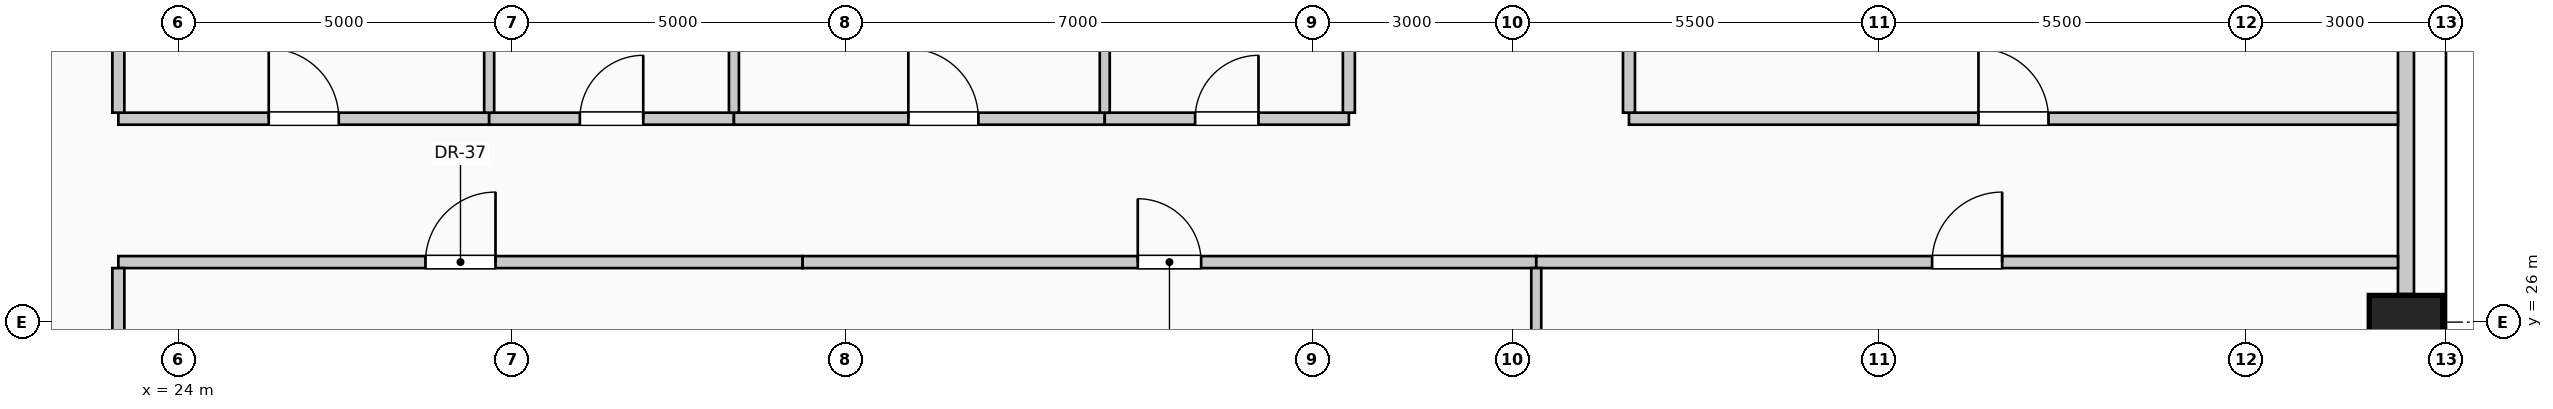
"""IFC4 building model, lengths in metres.
Left out: names, types, materials, properties, quantities, classifications, styles, units other than length and angle.
Written with IfcOpenShell. Run it as: python <this file> out.ifc"""

import sys

from ifc_helpers import new_model, si_unit, direction, frame, frame_2d, origin, origin_2d, place, context, subcontext, project, spatial, rectangle, extrude, element, fill, save


model = new_model("IFC4")
c1 = context("Model", 3, precision=1e-05, world=origin(), true_north=direction((0.0, 1.0)))
c2 = subcontext(c1, "Body", "Model", "MODEL_VIEW")
j1 = project(units=[si_unit("LENGTHUNIT", "METRE"), si_unit("PLANEANGLEUNIT", "RADIAN")], contexts=[c1])
p1 = place(None, origin())
s1 = spatial("IfcSite", under=j1, at=p1, CompositionType="ELEMENT")
p2 = place(p1, origin())
s2 = spatial("IfcBuilding", under=s1, at=p2, CompositionType="ELEMENT")
p3 = place(p2, frame((0.0, 0.0, 178.6)))
s3 = spatial("IfcBuildingStorey", under=s2, at=p3, CompositionType="ELEMENT", Elevation=178.6)
p4 = place(p3, frame((57.4, 26.0, 0.0), z_axis=(0.0, 0.0, 1.0), x_axis=(0.0, 1.0, 0.0)))
e1 = element("IfcColumn", 1, at=p4, inside=s3, PredefinedType="COLUMN", context=c2, shape_type="SweptSolid", body=[
    extrude(rectangle(XDim=0.8, YDim=1.1, at=origin_2d()), origin(), (0.0, 0.0, 1.0), 4.0),
])
p5 = place(p3, frame((57.4, 33.58, 0.0), z_axis=(0.0, 0.0, 1.0), x_axis=(0.0, -1.0, 0.0)))
e2 = element("IfcWall", 2, at=p5, inside=s3, PredefinedType="SOLIDWALL", context=c2, shape_type="SweptSolid", body=[
    extrude(rectangle(XDim=7.16, YDim=0.24, at=frame_2d((3.58, 0.0))), origin(), (0.0, 0.0, 1.0), 3.0),
])
p6 = place(p3, frame((23.1, 26.9, 0.0), z_axis=(0.0, 0.0, 1.0), x_axis=(1.0, 0.0, 0.0)))
e3 = element("IfcWall", 3, at=p6, inside=s3, PredefinedType="PARTITIONING", context=c2, shape_type="SweptSolid", body=[
    extrude(rectangle(XDim=10.26, YDim=0.18, at=frame_2d((5.13, 0.0))), origin(), (0.0, 0.0, 1.0), 3.75),
])
p7 = place(p6, frame((4.605, 0.0, 0.0)))
e4 = element("IfcOpeningElement", 4, at=p7, cuts=e3, PredefinedType="OPENING", context=c2, shape_type="SweptSolid", body=[
    extrude(rectangle(XDim=1.05, YDim=2.15, at=frame_2d((0.525, 1.075))), frame((0.0, 0.1, 0.0), z_axis=(0.0, -1.0, 0.0), x_axis=(1.0, 0.0, 0.0)), (0.0, 0.0, 1.0), 0.2),
])
p8 = place(p3, frame((33.36, 26.9, 0.0), z_axis=(0.0, 0.0, 1.0), x_axis=(1.0, 0.0, 0.0)))
e5 = element("IfcWall", 5, at=p8, inside=s3, PredefinedType="PARTITIONING", context=c2, shape_type="SweptSolid", body=[
    extrude(rectangle(XDim=11.0, YDim=0.18, at=frame_2d((5.5, 0.0))), origin(), (0.0, 0.0, 1.0), 3.75),
])
p9 = place(p8, frame((5.025, 0.0, 0.0)))
e6 = element("IfcOpeningElement", 6, at=p9, cuts=e5, PredefinedType="OPENING", context=c2, shape_type="SweptSolid", body=[
    extrude(rectangle(XDim=0.95, YDim=2.15, at=frame_2d((0.475, 1.075))), frame((0.0, 0.1, 0.0), z_axis=(0.0, -1.0, 0.0), x_axis=(1.0, 0.0, 0.0)), (0.0, 0.0, 1.0), 0.2),
])
p10 = place(p3, frame((44.36, 26.9, 0.0), z_axis=(0.0, 0.0, 1.0), x_axis=(1.0, 0.0, 0.0)))
e7 = element("IfcWall", 7, at=p10, inside=s3, PredefinedType="PARTITIONING", context=c2, shape_type="SweptSolid", body=[
    extrude(rectangle(XDim=12.92, YDim=0.18, at=frame_2d((6.46, 0.0))), origin(), (0.0, 0.0, 1.0), 3.75),
])
p11 = place(p10, frame((5.935, 0.0, 0.0)))
e8 = element("IfcOpeningElement", 8, at=p11, cuts=e7, PredefinedType="OPENING", context=c2, shape_type="SweptSolid", body=[
    extrude(rectangle(XDim=1.05, YDim=2.15, at=frame_2d((0.525, 1.075))), frame((0.0, 0.1, 0.0), z_axis=(0.0, -1.0, 0.0), x_axis=(1.0, 0.0, 0.0)), (0.0, 0.0, 1.0), 0.2),
])
p12 = place(p3, frame((23.1, 29.05, 0.0), z_axis=(0.0, 0.0, 1.0), x_axis=(1.0, 0.0, 0.0)))
e9 = element("IfcWall", 9, at=p12, inside=s3, PredefinedType="PARTITIONING", context=c2, shape_type="SweptSolid", body=[
    extrude(rectangle(XDim=5.56, YDim=0.18, at=frame_2d((2.78, 0.0))), origin(), (0.0, 0.0, 1.0), 3.75),
])
p13 = place(p12, frame((2.255, 0.0, 0.0)))
e10 = element("IfcOpeningElement", 10, at=p13, cuts=e9, PredefinedType="OPENING", context=c2, shape_type="SweptSolid", body=[
    extrude(rectangle(XDim=1.05, YDim=2.15, at=frame_2d((0.525, 1.075))), frame((0.0, 0.1, 0.0), z_axis=(0.0, -1.0, 0.0), x_axis=(1.0, 0.0, 0.0)), (0.0, 0.0, 1.0), 0.2),
])
p14 = place(p3, frame((28.66, 29.05, 0.0), z_axis=(0.0, 0.0, 1.0), x_axis=(1.0, 0.0, 0.0)))
e11 = element("IfcWall", 11, at=p14, inside=s3, PredefinedType="PARTITIONING", context=c2, shape_type="SweptSolid", body=[
    extrude(rectangle(XDim=3.67, YDim=0.18, at=frame_2d((1.835, 0.0))), origin(), (0.0, 0.0, 1.0), 3.75),
])
p15 = place(p14, frame((1.36, 0.0, 0.0)))
e12 = element("IfcOpeningElement", 12, at=p15, cuts=e11, PredefinedType="OPENING", context=c2, shape_type="SweptSolid", body=[
    extrude(rectangle(XDim=0.95, YDim=2.15, at=frame_2d((0.475, 1.075))), frame((0.0, 0.1, 0.0), z_axis=(0.0, -1.0, 0.0), x_axis=(1.0, 0.0, 0.0)), (0.0, 0.0, 1.0), 0.2),
])
p16 = place(p3, frame((32.33, 29.05, 0.0), z_axis=(0.0, 0.0, 1.0), x_axis=(1.0, 0.0, 0.0)))
e13 = element("IfcWall", 13, at=p16, inside=s3, PredefinedType="PARTITIONING", context=c2, shape_type="SweptSolid", body=[
    extrude(rectangle(XDim=5.56, YDim=0.18, at=frame_2d((2.78, 0.0))), origin(), (0.0, 0.0, 1.0), 3.75),
])
p17 = place(p16, frame((2.615, 0.0, 0.0)))
e14 = element("IfcOpeningElement", 14, at=p17, cuts=e13, PredefinedType="OPENING", context=c2, shape_type="SweptSolid", body=[
    extrude(rectangle(XDim=1.05, YDim=2.15, at=frame_2d((0.525, 1.075))), frame((0.0, 0.1, 0.0), z_axis=(0.0, -1.0, 0.0), x_axis=(1.0, 0.0, 0.0)), (0.0, 0.0, 1.0), 0.2),
])
p18 = place(p3, frame((37.89, 29.05, 0.0), z_axis=(0.0, 0.0, 1.0), x_axis=(1.0, 0.0, 0.0)))
e15 = element("IfcWall", 15, at=p18, inside=s3, PredefinedType="PARTITIONING", context=c2, shape_type="SweptSolid", body=[
    extrude(rectangle(XDim=3.66, YDim=0.18, at=frame_2d((1.83, 0.0))), origin(), (0.0, 0.0, 1.0), 3.75),
])
p19 = place(p18, frame((1.355, 0.0, 0.0)))
e16 = element("IfcOpeningElement", 16, at=p19, cuts=e15, PredefinedType="OPENING", context=c2, shape_type="SweptSolid", body=[
    extrude(rectangle(XDim=0.95, YDim=2.15, at=frame_2d((0.475, 1.075))), frame((0.0, 0.1, 0.0), z_axis=(0.0, -1.0, 0.0), x_axis=(1.0, 0.0, 0.0)), (0.0, 0.0, 1.0), 0.2),
])
p20 = place(p3, frame((45.75, 29.05, 0.0), z_axis=(0.0, 0.0, 1.0), x_axis=(1.0, 0.0, 0.0)))
e17 = element("IfcWall", 17, at=p20, inside=s3, PredefinedType="PARTITIONING", context=c2, shape_type="SweptSolid", body=[
    extrude(rectangle(XDim=11.53, YDim=0.18, at=frame_2d((5.765, 0.0))), origin(), (0.0, 0.0, 1.0), 3.75),
])
p21 = place(p20, frame((5.24, 0.0, 0.0)))
e18 = element("IfcOpeningElement", 18, at=p21, cuts=e17, PredefinedType="OPENING", context=c2, shape_type="SweptSolid", body=[
    extrude(rectangle(XDim=1.05, YDim=2.15, at=frame_2d((0.525, 1.075))), frame((0.0, 0.1, 0.0), z_axis=(0.0, -1.0, 0.0), x_axis=(1.0, 0.0, 0.0)), (0.0, 0.0, 1.0), 0.2),
])
p22 = place(p3, frame((23.1, 17.3, 0.0), z_axis=(0.0, 0.0, 1.0), x_axis=(0.0, 1.0, 0.0)))
e19 = element("IfcWall", 19, at=p22, inside=s3, PredefinedType="PARTITIONING", context=c2, shape_type="SweptSolid", body=[
    extrude(rectangle(XDim=9.51, YDim=0.18, at=frame_2d((4.755, 0.0))), origin(), (0.0, 0.0, 1.0), 3.75),
])
p23 = place(p3, frame((23.1, 29.14, 0.0), z_axis=(0.0, 0.0, 1.0), x_axis=(0.0, 1.0, 0.0)))
e20 = element("IfcWall", 20, at=p23, inside=s3, PredefinedType="PARTITIONING", context=c2, shape_type="SweptSolid", body=[
    extrude(rectangle(XDim=3.12, YDim=0.18, at=frame_2d((1.56, 0.0))), origin(), (0.0, 0.0, 1.0), 3.75),
])
p24 = place(p3, frame((28.66, 29.14, 0.0), z_axis=(0.0, 0.0, 1.0), x_axis=(0.0, 1.0, 0.0)))
e21 = element("IfcWall", 21, at=p24, inside=s3, PredefinedType="PARTITIONING", context=c2, shape_type="SweptSolid", body=[
    extrude(rectangle(XDim=4.435, YDim=0.15, at=frame_2d((2.218, 0.0))), origin(), (0.0, 0.0, 1.0), 3.75),
])
for number, where, z_axis, x_axis in (
    (22, (32.33, 29.14, 0.0), (0.0, 0.0, 1.0), (0.0, 1.0, 0.0)),
    (23, (37.89, 29.14, 0.0), (0.0, 0.0, 1.0), (0.0, 1.0, 0.0)),
):
    element("IfcWall", number, at=place(p3, frame(where, z_axis=z_axis, x_axis=x_axis)), inside=s3, PredefinedType="PARTITIONING", context=c2, shape_type="SweptSolid", body=[
        extrude(rectangle(XDim=16.14, YDim=0.15, at=frame_2d((8.07, 0.0))), origin(), (0.0, 0.0, 1.0), 3.75),
    ])
p25 = place(p3, frame((41.55, 29.14, 0.0), z_axis=(0.0, 0.0, 1.0), x_axis=(0.0, 1.0, 0.0)))
e24 = element("IfcWall", 24, at=p25, inside=s3, PredefinedType="PARTITIONING", context=c2, shape_type="SweptSolid", body=[
    extrude(rectangle(XDim=3.21, YDim=0.18, at=frame_2d((1.605, 0.0))), origin(), (0.0, 0.0, 1.0), 3.145),
])
p26 = place(p3, frame((44.36, 1.15, 0.0), z_axis=(0.0, 0.0, 1.0), x_axis=(0.0, 1.0, 0.0)))
e25 = element("IfcWall", 25, at=p26, inside=s3, PredefinedType="PARTITIONING", context=c2, shape_type="SweptSolid", body=[
    extrude(rectangle(XDim=25.66, YDim=0.15, at=frame_2d((12.83, 0.0))), origin(), (0.0, 0.0, 1.0), 3.75),
])
p27 = place(p3, frame((45.75, 29.14, 0.0), z_axis=(0.0, 0.0, 1.0), x_axis=(0.0, 1.0, 0.0)))
e26 = element("IfcWall", 26, at=p27, inside=s3, PredefinedType="PARTITIONING", context=c2, shape_type="SweptSolid", body=[
    extrude(rectangle(XDim=3.135, YDim=0.18, at=frame_2d((1.567, 0.0))), origin(), (0.0, 0.0, 1.0), 3.75),
])
p28 = place(p7, origin())
e27 = element("IfcDoor", 27, at=p28, inside=s3, OperationType="SINGLE_SWING_RIGHT", PredefinedType="DOOR", context=c2, shape_type="SweptSolid", body=[
    extrude(rectangle(XDim=1.05, YDim=2.15, at=frame_2d((0.525, 1.075))), frame((0.0, 0.025, 0.0), z_axis=(0.0, -1.0, 0.0), x_axis=(1.0, 0.0, 0.0)), (0.0, 0.0, 1.0), 0.05),
])
fill(e4, e27)
p29 = place(p9, origin())
e28 = element("IfcDoor", 28, at=p29, inside=s3, OperationType="SINGLE_SWING_LEFT", PredefinedType="DOOR", context=c2, shape_type="SweptSolid", body=[
    extrude(rectangle(XDim=0.95, YDim=2.15, at=frame_2d((0.475, 1.075))), frame((0.0, 0.025, 0.0), z_axis=(0.0, -1.0, 0.0), x_axis=(1.0, 0.0, 0.0)), (0.0, 0.0, 1.0), 0.05),
])
fill(e6, e28)
p30 = place(p11, origin())
e29 = element("IfcDoor", 29, at=p30, inside=s3, OperationType="SINGLE_SWING_RIGHT", PredefinedType="DOOR", context=c2, shape_type="SweptSolid", body=[
    extrude(rectangle(XDim=1.05, YDim=2.15, at=frame_2d((0.525, 1.075))), frame((0.0, 0.025, 0.0), z_axis=(0.0, -1.0, 0.0), x_axis=(1.0, 0.0, 0.0)), (0.0, 0.0, 1.0), 0.05),
])
fill(e8, e29)
p31 = place(p13, origin())
e30 = element("IfcDoor", 30, at=p31, inside=s3, OperationType="SINGLE_SWING_LEFT", PredefinedType="DOOR", context=c2, shape_type="SweptSolid", body=[
    extrude(rectangle(XDim=1.05, YDim=2.15, at=frame_2d((0.525, 1.075))), frame((0.0, 0.025, 0.0), z_axis=(0.0, -1.0, 0.0), x_axis=(1.0, 0.0, 0.0)), (0.0, 0.0, 1.0), 0.05),
])
fill(e10, e30)
p32 = place(p15, origin())
e31 = element("IfcDoor", 31, at=p32, inside=s3, OperationType="SINGLE_SWING_RIGHT", PredefinedType="DOOR", context=c2, shape_type="SweptSolid", body=[
    extrude(rectangle(XDim=0.95, YDim=2.15, at=frame_2d((0.475, 1.075))), frame((0.0, 0.025, 0.0), z_axis=(0.0, -1.0, 0.0), x_axis=(1.0, 0.0, 0.0)), (0.0, 0.0, 1.0), 0.05),
])
fill(e12, e31)
p33 = place(p17, origin())
e32 = element("IfcDoor", 32, at=p33, inside=s3, OperationType="SINGLE_SWING_LEFT", PredefinedType="DOOR", context=c2, shape_type="SweptSolid", body=[
    extrude(rectangle(XDim=1.05, YDim=2.15, at=frame_2d((0.525, 1.075))), frame((0.0, 0.025, 0.0), z_axis=(0.0, -1.0, 0.0), x_axis=(1.0, 0.0, 0.0)), (0.0, 0.0, 1.0), 0.05),
])
fill(e14, e32)
p34 = place(p19, origin())
e33 = element("IfcDoor", 33, at=p34, inside=s3, OperationType="SINGLE_SWING_RIGHT", PredefinedType="DOOR", context=c2, shape_type="SweptSolid", body=[
    extrude(rectangle(XDim=0.95, YDim=2.15, at=frame_2d((0.475, 1.075))), frame((0.0, 0.025, 0.0), z_axis=(0.0, -1.0, 0.0), x_axis=(1.0, 0.0, 0.0)), (0.0, 0.0, 1.0), 0.05),
])
fill(e16, e33)
p35 = place(p21, origin())
e34 = element("IfcDoor", 34, at=p35, inside=s3, OperationType="SINGLE_SWING_LEFT", PredefinedType="DOOR", context=c2, shape_type="SweptSolid", body=[
    extrude(rectangle(XDim=1.05, YDim=2.15, at=frame_2d((0.525, 1.075))), frame((0.0, 0.025, 0.0), z_axis=(0.0, -1.0, 0.0), x_axis=(1.0, 0.0, 0.0)), (0.0, 0.0, 1.0), 0.05),
])
fill(e18, e34)
save(model, sys.argv[1])
